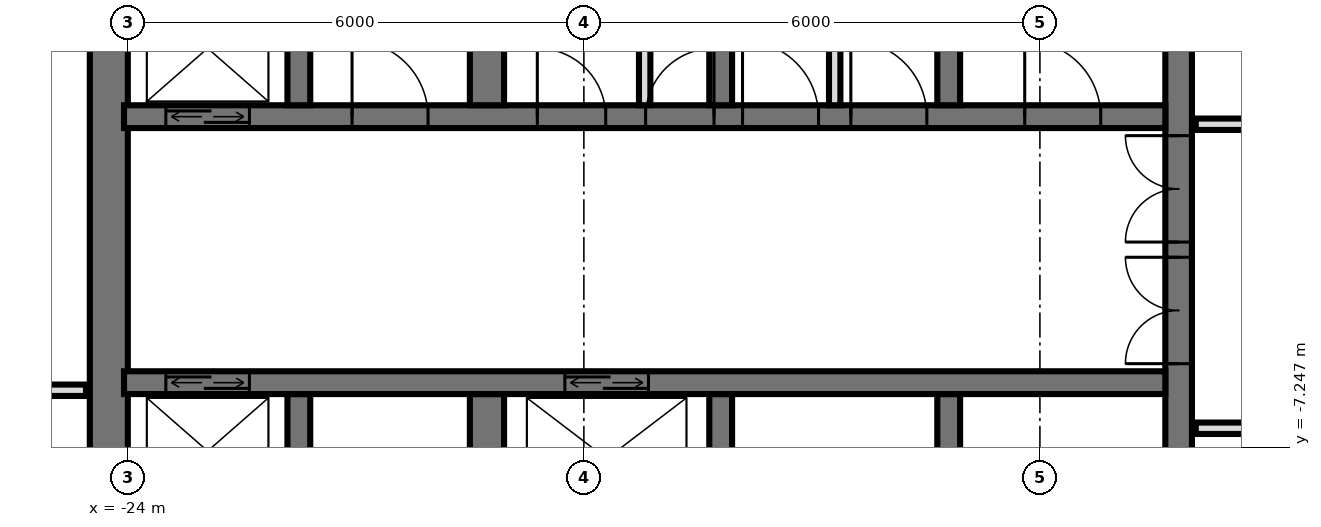
"""IFC4 building model, lengths in metres.
Left out: names, types, materials, properties, quantities, classifications, styles, units other than length and angle.
Written with IfcOpenShell. Run it as: python <this file> out.ifc"""

import sys

from ifc_helpers import new_model, si_unit, direction, frame, frame_2d, origin, place, context, subcontext, project, spatial, rectangle, extrude, element, fill, save


model = new_model("IFC4")
c1 = context("Model", 3, precision=1e-05, world=origin(), true_north=direction((0.0, 1.0)))
c2 = subcontext(c1, "Body", "Model", "MODEL_VIEW")
j1 = project(units=[si_unit("LENGTHUNIT", "METRE"), si_unit("PLANEANGLEUNIT", "RADIAN")], contexts=[c1])
p1 = place(None, origin())
s1 = spatial("IfcSite", under=j1, at=p1, CompositionType="ELEMENT")
p2 = place(p1, origin())
s2 = spatial("IfcBuilding", under=s1, at=p2, CompositionType="ELEMENT")
p3 = place(p2, frame((0.0, 0.0, 163.2)))
s3 = spatial("IfcBuildingStorey", under=s2, at=p3, CompositionType="ELEMENT", Elevation=163.2)
p4 = place(p3, frame((-10.175, -14.55, 0.0), z_axis=(0.0, 0.0, 1.0), x_axis=(0.0, 1.0, 0.0)))
e1 = element("IfcWall", 1, at=p4, inside=s3, PredefinedType="SHEAR", context=c2, shape_type="SweptSolid", body=[
    extrude(rectangle(XDim=14.1, YDim=0.35, at=frame_2d((7.05, 0.0))), origin(), (0.0, 0.0, 1.0), 3.6),
])
p5 = place(p4, frame((8.4, 0.0, 0.0)))
e2 = element("IfcOpeningElement", 2, at=p5, cuts=e1, PredefinedType="OPENING", context=c2, shape_type="SweptSolid", body=[
    extrude(rectangle(XDim=1.4, YDim=2.4, at=frame_2d((0.7, 1.2))), frame((0.0, 0.185, 0.0), z_axis=(0.0, -1.0, 0.0), x_axis=(1.0, 0.0, 0.0)), (0.0, 0.0, 1.0), 0.37),
])
p6 = place(p4, frame((10.0, 0.0, 0.0)))
e3 = element("IfcOpeningElement", 3, at=p6, cuts=e1, PredefinedType="OPENING", context=c2, shape_type="SweptSolid", body=[
    extrude(rectangle(XDim=1.4, YDim=2.4, at=frame_2d((0.7, 1.2))), frame((0.0, 0.185, 0.0), z_axis=(0.0, -1.0, 0.0), x_axis=(1.0, 0.0, 0.0)), (0.0, 0.0, 1.0), 0.37),
])
p7 = place(p4, frame((4.0, 0.0, 0.0)))
e4 = element("IfcOpeningElement", 4, at=p7, cuts=e1, PredefinedType="OPENING", context=c2, shape_type="SweptSolid", body=[
    extrude(rectangle(XDim=1.2, YDim=2.1, at=frame_2d((0.6, 1.05))), frame((0.0, 0.185, 0.0), z_axis=(0.0, -1.0, 0.0), x_axis=(1.0, 0.0, 0.0)), (0.0, 0.0, 1.0), 0.37),
])
p8 = place(p3, frame((-24.25, -14.55, 0.0), z_axis=(0.0, 0.0, 1.0), x_axis=(0.0, 1.0, 0.0)))
e5 = element("IfcWall", 5, at=p8, inside=s3, PredefinedType="SHEAR", context=c2, shape_type="SweptSolid", body=[
    extrude(rectangle(XDim=14.1, YDim=0.5, at=frame_2d((7.05, 0.0))), origin(), (0.0, 0.0, 1.0), 3.6),
])
p9 = place(p3, frame((-24.05, -2.9, 0.0), z_axis=(0.0, 0.0, 1.0), x_axis=(1.0, 0.0, 0.0)))
e6 = element("IfcWall", 6, at=p9, inside=s3, PredefinedType="SHEAR", context=c2, shape_type="SweptSolid", body=[
    extrude(rectangle(XDim=13.7, YDim=0.3, at=frame_2d((6.85, 0.0))), origin(), (0.0, 0.0, 1.0), 3.6),
])
p10 = place(p9, frame((0.55, 0.0, 0.0)))
e7 = element("IfcOpeningElement", 7, at=p10, cuts=e6, PredefinedType="OPENING", context=c2, shape_type="SweptSolid", body=[
    extrude(rectangle(XDim=1.1, YDim=2.1, at=frame_2d((0.55, 1.05))), frame((0.0, 0.16, 0.0), z_axis=(0.0, -1.0, 0.0), x_axis=(1.0, 0.0, 0.0)), (0.0, 0.0, 1.0), 0.32),
])
p11 = place(p9, frame((6.863, 0.0, 0.0)))
e8 = element("IfcOpeningElement", 8, at=p11, cuts=e6, PredefinedType="OPENING", context=c2, shape_type="SweptSolid", body=[
    extrude(rectangle(XDim=0.9, YDim=2.1, at=frame_2d((0.45, 1.05))), frame((0.0, 0.16, 0.0), z_axis=(0.0, -1.0, 0.0), x_axis=(1.0, 0.0, 0.0)), (0.0, 0.0, 1.0), 0.32),
])
p12 = place(p9, frame((5.438, 0.0, 0.0)))
e9 = element("IfcOpeningElement", 9, at=p12, cuts=e6, PredefinedType="OPENING", context=c2, shape_type="SweptSolid", body=[
    extrude(rectangle(XDim=0.9, YDim=2.1, at=frame_2d((0.45, 1.05))), frame((0.0, 0.16, 0.0), z_axis=(0.0, -1.0, 0.0), x_axis=(1.0, 0.0, 0.0)), (0.0, 0.0, 1.0), 0.32),
])
p13 = place(p9, frame((11.85, 0.0, 0.0)))
e10 = element("IfcOpeningElement", 10, at=p13, cuts=e6, PredefinedType="OPENING", context=c2, shape_type="SweptSolid", body=[
    extrude(rectangle(XDim=1.0, YDim=2.1, at=frame_2d((0.5, 1.05))), frame((0.0, 0.16, 0.0), z_axis=(0.0, -1.0, 0.0), x_axis=(1.0, 0.0, 0.0)), (0.0, 0.0, 1.0), 0.32),
])
p14 = place(p9, frame((9.562, 0.0, 0.0)))
e11 = element("IfcOpeningElement", 11, at=p14, cuts=e6, PredefinedType="OPENING", context=c2, shape_type="SweptSolid", body=[
    extrude(rectangle(XDim=1.0, YDim=2.1, at=frame_2d((0.5, 1.05))), frame((0.0, 0.16, 0.0), z_axis=(0.0, -1.0, 0.0), x_axis=(1.0, 0.0, 0.0)), (0.0, 0.0, 1.0), 0.32),
])
p15 = place(p9, frame((8.137, 0.0, 0.0)))
e12 = element("IfcOpeningElement", 12, at=p15, cuts=e6, PredefinedType="OPENING", context=c2, shape_type="SweptSolid", body=[
    extrude(rectangle(XDim=1.0, YDim=2.1, at=frame_2d((0.5, 1.05))), frame((0.0, 0.16, 0.0), z_axis=(0.0, -1.0, 0.0), x_axis=(1.0, 0.0, 0.0)), (0.0, 0.0, 1.0), 0.32),
])
p16 = place(p9, frame((3.0, 0.0, 0.0)))
e13 = element("IfcOpeningElement", 13, at=p16, cuts=e6, PredefinedType="OPENING", context=c2, shape_type="SweptSolid", body=[
    extrude(rectangle(XDim=1.0, YDim=2.1, at=frame_2d((0.5, 1.05))), frame((0.0, 0.16, 0.0), z_axis=(0.0, -1.0, 0.0), x_axis=(1.0, 0.0, 0.0)), (0.0, 0.0, 1.0), 0.32),
])
p17 = place(p3, frame((-24.05, -6.4, 0.0), z_axis=(0.0, 0.0, 1.0), x_axis=(1.0, 0.0, 0.0)))
e14 = element("IfcWall", 14, at=p17, inside=s3, PredefinedType="SHEAR", context=c2, shape_type="SweptSolid", body=[
    extrude(rectangle(XDim=13.7, YDim=0.3, at=frame_2d((6.85, 0.0))), origin(), (0.0, 0.0, 1.0), 3.6),
])
p18 = place(p17, frame((0.55, 0.0, 0.0)))
e15 = element("IfcOpeningElement", 15, at=p18, cuts=e14, PredefinedType="OPENING", context=c2, shape_type="SweptSolid", body=[
    extrude(rectangle(XDim=1.1, YDim=2.1, at=frame_2d((0.55, 1.05))), frame((0.0, 0.16, 0.0), z_axis=(0.0, -1.0, 0.0), x_axis=(1.0, 0.0, 0.0)), (0.0, 0.0, 1.0), 0.32),
])
p19 = place(p17, frame((5.8, 0.0, 0.0)))
e16 = element("IfcOpeningElement", 16, at=p19, cuts=e14, PredefinedType="OPENING", context=c2, shape_type="SweptSolid", body=[
    extrude(rectangle(XDim=1.1, YDim=2.1, at=frame_2d((0.55, 1.05))), frame((0.0, 0.16, 0.0), z_axis=(0.0, -1.0, 0.0), x_axis=(1.0, 0.0, 0.0)), (0.0, 0.0, 1.0), 0.32),
])
for number, where, z_axis, x_axis in (
    (17, (-13.2, -2.75, 0.0), (0.0, 0.0, 1.0), (0.0, 1.0, 0.0)),
    (18, (-13.2, -8.85, 0.0), (0.0, 0.0, 1.0), (0.0, 1.0, 0.0)),
    (19, (-16.2, -2.75, 0.0), (0.0, 0.0, 1.0), (0.0, 1.0, 0.0)),
    (20, (-16.2, -8.85, 0.0), (0.0, 0.0, 1.0), (0.0, 1.0, 0.0)),
):
    element("IfcWall", number, at=place(p3, frame(where, z_axis=z_axis, x_axis=x_axis)), inside=s3, PredefinedType="SHEAR", context=c2, shape_type="SweptSolid", body=[
        extrude(rectangle(XDim=2.3, YDim=0.3, at=frame_2d((1.15, 0.0))), origin(), (0.0, 0.0, 1.0), 3.6),
    ])
for number, where, z_axis, x_axis in (
    (21, (-19.275, -2.75, 0.0), (0.0, 0.0, 1.0), (0.0, 1.0, 0.0)),
    (22, (-19.275, -8.85, 0.0), (0.0, 0.0, 1.0), (0.0, 1.0, 0.0)),
):
    element("IfcWall", number, at=place(p3, frame(where, z_axis=z_axis, x_axis=x_axis)), inside=s3, PredefinedType="SHEAR", context=c2, shape_type="SweptSolid", body=[
        extrude(rectangle(XDim=2.3, YDim=0.45, at=frame_2d((1.15, 0.0))), origin(), (0.0, 0.0, 1.0), 3.6),
    ])
for number, where, z_axis, x_axis in (
    (23, (-21.75, -2.75, 0.0), (0.0, 0.0, 1.0), (0.0, 1.0, 0.0)),
    (24, (-21.75, -8.85, 0.0), (0.0, 0.0, 1.0), (0.0, 1.0, 0.0)),
):
    element("IfcWall", number, at=place(p3, frame(where, z_axis=z_axis, x_axis=x_axis)), inside=s3, PredefinedType="SHEAR", context=c2, shape_type="SweptSolid", body=[
        extrude(rectangle(XDim=2.3, YDim=0.3, at=frame_2d((1.15, 0.0))), origin(), (0.0, 0.0, 1.0), 3.6),
    ])
for number, where, z_axis, x_axis in (
    (25, (-17.2, -2.75, 0.0), (0.0, 0.0, 1.0), (0.0, 1.0, 0.0)),
    (26, (-14.7, -2.75, 0.0), (0.0, 0.0, 1.0), (0.0, 1.0, 0.0)),
):
    element("IfcWall", number, at=place(p3, frame(where, z_axis=z_axis, x_axis=x_axis)), inside=s3, PredefinedType="PARTITIONING", context=c2, shape_type="SweptSolid", body=[
        extrude(rectangle(XDim=2.3, YDim=0.15, at=frame_2d((1.15, 0.0))), origin(), (0.0, 0.0, 1.0), 3.3),
    ])
p20 = place(p3, frame((-9.95, -7.0, 0.0), z_axis=(0.0, 0.0, 1.0), x_axis=(1.0, 0.0, 0.0)))
e27 = element("IfcWall", 27, at=p20, inside=s3, PredefinedType="PARTITIONING", context=c2, shape_type="SweptSolid", body=[
    extrude(rectangle(XDim=19.9, YDim=0.15, at=frame_2d((9.95, 0.0))), origin(), (0.0, 0.0, 1.0), 3.32),
])
p21 = place(p20, frame((9.45, 0.0, 0.0)))
e28 = element("IfcOpeningElement", 28, at=p21, cuts=e27, PredefinedType="OPENING", context=c2, shape_type="SweptSolid", body=[
    extrude(rectangle(XDim=1.0, YDim=2.1, at=frame_2d((0.5, 1.05))), frame((0.0, 0.085, 0.0), z_axis=(0.0, -1.0, 0.0), x_axis=(1.0, 0.0, 0.0)), (0.0, 0.0, 1.0), 0.17),
])
p22 = place(p20, frame((3.45, 0.0, 0.0)))
e29 = element("IfcOpeningElement", 29, at=p22, cuts=e27, PredefinedType="OPENING", context=c2, shape_type="SweptSolid", body=[
    extrude(rectangle(XDim=1.0, YDim=2.1, at=frame_2d((0.5, 1.05))), frame((0.0, 0.085, 0.0), z_axis=(0.0, -1.0, 0.0), x_axis=(1.0, 0.0, 0.0)), (0.0, 0.0, 1.0), 0.17),
])
p23 = place(p3, frame((-28.02, -6.5, 0.0), z_axis=(0.0, 0.0, 1.0), x_axis=(1.0, 0.0, 0.0)))
e30 = element("IfcWall", 30, at=p23, inside=s3, PredefinedType="PARTITIONING", context=c2, shape_type="SweptSolid", body=[
    extrude(rectangle(XDim=3.47, YDim=0.15, at=frame_2d((1.735, 0.0))), origin(), (0.0, 0.0, 1.0), 3.32),
])
p24 = place(p23, frame((1.22, 0.0, 0.0)))
e31 = element("IfcOpeningElement", 31, at=p24, cuts=e30, PredefinedType="OPENING", context=c2, shape_type="SweptSolid", body=[
    extrude(rectangle(XDim=0.9, YDim=2.1, at=frame_2d((0.45, 1.05))), frame((0.0, 0.085, 0.0), z_axis=(0.0, -1.0, 0.0), x_axis=(1.0, 0.0, 0.0)), (0.0, 0.0, 1.0), 0.17),
])
p25 = place(p3, frame((-9.95, -3.0, 0.0), z_axis=(0.0, 0.0, 1.0), x_axis=(1.0, 0.0, 0.0)))
e32 = element("IfcWall", 32, at=p25, inside=s3, PredefinedType="PARTITIONING", context=c2, shape_type="SweptSolid", body=[
    extrude(rectangle(XDim=19.9, YDim=0.15, at=frame_2d((9.95, 0.0))), origin(), (0.0, 0.0, 1.0), 3.32),
])
p26 = place(p25, frame((1.45, 0.0, 0.0)))
e33 = element("IfcOpeningElement", 33, at=p26, cuts=e32, PredefinedType="OPENING", context=c2, shape_type="SweptSolid", body=[
    extrude(rectangle(XDim=1.0, YDim=2.1, at=frame_2d((0.5, 1.05))), frame((0.0, 0.085, 0.0), z_axis=(0.0, -1.0, 0.0), x_axis=(1.0, 0.0, 0.0)), (0.0, 0.0, 1.0), 0.17),
])
p27 = place(p25, frame((4.95, 0.0, 0.0)))
e34 = element("IfcOpeningElement", 34, at=p27, cuts=e32, PredefinedType="OPENING", context=c2, shape_type="SweptSolid", body=[
    extrude(rectangle(XDim=1.0, YDim=2.1, at=frame_2d((0.5, 1.05))), frame((0.0, 0.085, 0.0), z_axis=(0.0, -1.0, 0.0), x_axis=(1.0, 0.0, 0.0)), (0.0, 0.0, 1.0), 0.17),
])
p28 = place(p25, frame((7.7, 0.0, 0.0)))
e35 = element("IfcOpeningElement", 35, at=p28, cuts=e32, PredefinedType="OPENING", context=c2, shape_type="SweptSolid", body=[
    extrude(rectangle(XDim=1.0, YDim=2.1, at=frame_2d((0.5, 1.05))), frame((0.0, 0.085, 0.0), z_axis=(0.0, -1.0, 0.0), x_axis=(1.0, 0.0, 0.0)), (0.0, 0.0, 1.0), 0.17),
])
p29 = place(p25, frame((14.2, 0.0, 0.0)))
e36 = element("IfcOpeningElement", 36, at=p29, cuts=e32, PredefinedType="OPENING", context=c2, shape_type="SweptSolid", body=[
    extrude(rectangle(XDim=1.0, YDim=2.1, at=frame_2d((0.5, 1.05))), frame((0.0, 0.085, 0.0), z_axis=(0.0, -1.0, 0.0), x_axis=(1.0, 0.0, 0.0)), (0.0, 0.0, 1.0), 0.17),
])
p30 = place(p10, origin())
e37 = element("IfcDoor", 37, at=p30, inside=s3, OperationType="DOUBLE_DOOR_SLIDING", PredefinedType="USERDEFINED", context=c2, shape_type="SweptSolid", body=[
    extrude(rectangle(XDim=1.1, YDim=2.1, at=frame_2d((0.55, 1.05))), frame((0.0, 0.025, 0.0), z_axis=(0.0, -1.0, 0.0), x_axis=(1.0, 0.0, 0.0)), (0.0, 0.0, 1.0), 0.05),
])
fill(e7, e37)
p31 = place(p18, origin())
e38 = element("IfcDoor", 38, at=p31, inside=s3, OperationType="DOUBLE_DOOR_SLIDING", PredefinedType="USERDEFINED", context=c2, shape_type="SweptSolid", body=[
    extrude(rectangle(XDim=1.1, YDim=2.1, at=frame_2d((0.55, 1.05))), frame((0.0, 0.025, 0.0), z_axis=(0.0, -1.0, 0.0), x_axis=(1.0, 0.0, 0.0)), (0.0, 0.0, 1.0), 0.05),
])
fill(e15, e38)
p32 = place(p19, origin())
e39 = element("IfcDoor", 39, at=p32, inside=s3, OperationType="DOUBLE_DOOR_SLIDING", PredefinedType="USERDEFINED", context=c2, shape_type="SweptSolid", body=[
    extrude(rectangle(XDim=1.1, YDim=2.1, at=frame_2d((0.55, 1.05))), frame((0.0, 0.025, 0.0), z_axis=(0.0, -1.0, 0.0), x_axis=(1.0, 0.0, 0.0)), (0.0, 0.0, 1.0), 0.05),
])
fill(e16, e39)
p33 = place(p5, origin())
e40 = element("IfcDoor", 40, at=p33, inside=s3, OperationType="DOUBLE_DOOR_SINGLE_SWING", PredefinedType="DOOR", context=c2, shape_type="SweptSolid", body=[
    extrude(rectangle(XDim=1.4, YDim=2.4, at=frame_2d((0.7, 1.2))), frame((0.0, 0.025, 0.0), z_axis=(0.0, -1.0, 0.0), x_axis=(1.0, 0.0, 0.0)), (0.0, 0.0, 1.0), 0.05),
])
fill(e2, e40)
p34 = place(p6, origin())
e41 = element("IfcDoor", 41, at=p34, inside=s3, OperationType="DOUBLE_DOOR_SINGLE_SWING", PredefinedType="DOOR", context=c2, shape_type="SweptSolid", body=[
    extrude(rectangle(XDim=1.4, YDim=2.4, at=frame_2d((0.7, 1.2))), frame((0.0, 0.025, 0.0), z_axis=(0.0, -1.0, 0.0), x_axis=(1.0, 0.0, 0.0)), (0.0, 0.0, 1.0), 0.05),
])
fill(e3, e41)
p35 = place(p11, origin())
e42 = element("IfcDoor", 42, at=p35, inside=s3, OperationType="SINGLE_SWING_LEFT", PredefinedType="DOOR", context=c2, shape_type="SweptSolid", body=[
    extrude(rectangle(XDim=0.9, YDim=2.1, at=frame_2d((0.45, 1.05))), frame((0.0, 0.025, 0.0), z_axis=(0.0, -1.0, 0.0), x_axis=(1.0, 0.0, 0.0)), (0.0, 0.0, 1.0), 0.05),
])
fill(e8, e42)
p36 = place(p12, origin())
e43 = element("IfcDoor", 43, at=p36, inside=s3, OperationType="SINGLE_SWING_RIGHT", PredefinedType="DOOR", context=c2, shape_type="SweptSolid", body=[
    extrude(rectangle(XDim=0.9, YDim=2.1, at=frame_2d((0.45, 1.05))), frame((0.0, 0.025, 0.0), z_axis=(0.0, -1.0, 0.0), x_axis=(1.0, 0.0, 0.0)), (0.0, 0.0, 1.0), 0.05),
])
fill(e9, e43)
p37 = place(p13, origin())
e44 = element("IfcDoor", 44, at=p37, inside=s3, OperationType="SINGLE_SWING_RIGHT", PredefinedType="DOOR", context=c2, shape_type="SweptSolid", body=[
    extrude(rectangle(XDim=1.0, YDim=2.1, at=frame_2d((0.5, 1.05))), frame((0.0, 0.025, 0.0), z_axis=(0.0, -1.0, 0.0), x_axis=(1.0, 0.0, 0.0)), (0.0, 0.0, 1.0), 0.05),
])
fill(e10, e44)
p38 = place(p14, origin())
e45 = element("IfcDoor", 45, at=p38, inside=s3, OperationType="SINGLE_SWING_RIGHT", PredefinedType="DOOR", context=c2, shape_type="SweptSolid", body=[
    extrude(rectangle(XDim=1.0, YDim=2.1, at=frame_2d((0.5, 1.05))), frame((0.0, 0.025, 0.0), z_axis=(0.0, -1.0, 0.0), x_axis=(1.0, 0.0, 0.0)), (0.0, 0.0, 1.0), 0.05),
])
fill(e11, e45)
p39 = place(p15, origin())
e46 = element("IfcDoor", 46, at=p39, inside=s3, OperationType="SINGLE_SWING_RIGHT", PredefinedType="DOOR", context=c2, shape_type="SweptSolid", body=[
    extrude(rectangle(XDim=1.0, YDim=2.1, at=frame_2d((0.5, 1.05))), frame((0.0, 0.025, 0.0), z_axis=(0.0, -1.0, 0.0), x_axis=(1.0, 0.0, 0.0)), (0.0, 0.0, 1.0), 0.05),
])
fill(e12, e46)
p40 = place(p16, origin())
e47 = element("IfcDoor", 47, at=p40, inside=s3, OperationType="SINGLE_SWING_RIGHT", PredefinedType="DOOR", context=c2, shape_type="SweptSolid", body=[
    extrude(rectangle(XDim=1.0, YDim=2.1, at=frame_2d((0.5, 1.05))), frame((0.0, 0.025, 0.0), z_axis=(0.0, -1.0, 0.0), x_axis=(1.0, 0.0, 0.0)), (0.0, 0.0, 1.0), 0.05),
])
fill(e13, e47)
save(model, sys.argv[1])
